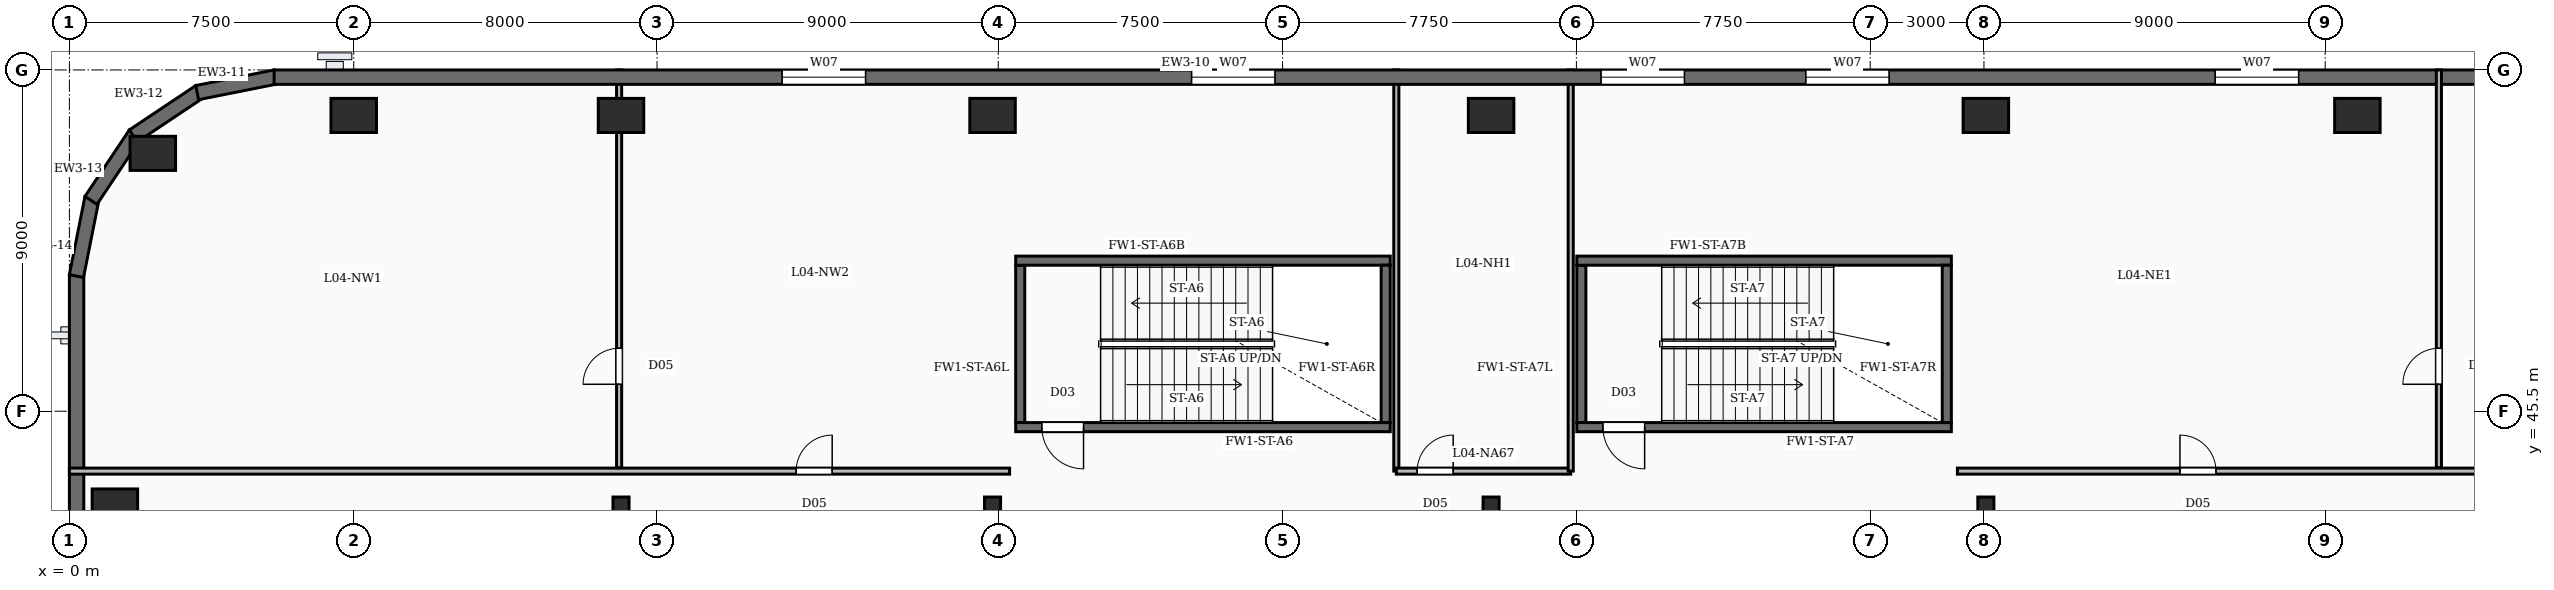
"""IFC4 building model, lengths in metres.
Left out: names, types, materials, properties, quantities, classifications, styles, units other than length and angle.
Written with IfcOpenShell. Run it as: python <this file> out.ifc"""

import sys

from ifc_helpers import new_model, si_unit, direction, frame, frame_2d, origin, origin_2d, place, context, subcontext, project, spatial, rectangle, i_section, extrude, element, fill, save


model = new_model("IFC4")
c1 = context("Model", 3, precision=1e-05, world=origin(), true_north=direction((0.0, 1.0)))
c2 = subcontext(c1, "Body", "Model", "MODEL_VIEW")
j1 = project(units=[si_unit("LENGTHUNIT", "METRE"), si_unit("PLANEANGLEUNIT", "RADIAN")], contexts=[c1])
p1 = place(None, origin())
s1 = spatial("IfcSite", under=j1, at=p1, CompositionType="ELEMENT")
p2 = place(p1, origin())
s2 = spatial("IfcBuilding", under=s1, at=p2, CompositionType="ELEMENT")
p3 = place(p2, frame((0.0, 0.0, 23.0)))
s3 = spatial("IfcBuildingStorey", under=s2, at=p3, CompositionType="ELEMENT", Elevation=23.0)
for number, where, z_axis, x_axis in (
    (1, (60.35, 53.3, -0.35), (0.0, 0.0, 1.0), (1.0, 0.0, 0.0)),
    (2, (50.55, 53.3, -0.35), (0.0, 0.0, 1.0), (1.0, 0.0, 0.0)),
    (3, (37.5, 53.3, -0.35), (0.0, 0.0, 1.0), (1.0, 0.0, 0.0)),
    (4, (24.35, 53.3, -0.35), (0.0, 0.0, 1.0), (1.0, 0.0, 0.0)),
    (5, (14.55, 53.3, -0.35), (0.0, 0.0, 1.0), (1.0, 0.0, 0.0)),
    (6, (7.5, 53.3, -0.35), (0.0, 0.0, 1.0), (1.0, 0.0, 0.0)),
    (7, (2.2, 52.3, -0.35), (0.0, 0.0, 1.0), (1.0, 0.0, 0.0)),
    (8, (1.2, 43.0, -0.35), (0.0, 0.0, 1.0), (1.0, 0.0, 0.0)),
):
    element("IfcColumn", number, at=place(p3, frame(where, z_axis=z_axis, x_axis=x_axis)), inside=s3, PredefinedType="COLUMN", context=c2, shape_type="SweptSolid", body=[
        extrude(rectangle(XDim=1.2, YDim=0.9, at=origin_2d()), origin(), (0.0, 0.0, 1.0), 5.0),
    ])
for number, where, z_axis, x_axis in (
    (9, (14.55, 43.0, -0.35), (0.0, 0.0, 1.0), (1.0, 0.0, 0.0)),
    (10, (24.35, 43.0, -0.35), (0.0, 0.0, 1.0), (1.0, 0.0, 0.0)),
    (11, (37.5, 43.0, -0.35), (0.0, 0.0, 1.0), (1.0, 0.0, 0.0)),
    (12, (50.55, 43.0, -0.35), (0.0, 0.0, 1.0), (1.0, 0.0, 0.0)),
):
    element("IfcColumn", number, at=place(p3, frame(where, z_axis=z_axis, x_axis=x_axis)), inside=s3, PredefinedType="COLUMN", context=c2, shape_type="SweptSolid", body=[
        extrude(i_section(OverallWidth=0.424, OverallDepth=0.474, WebThickness=0.048, FlangeThickness=0.077, FilletRadius=0.02, at=origin_2d()), origin(), (0.0, 0.0, 1.0), 5.0),
    ])
p4 = place(p3, frame((5.4, 54.31, 0.0), z_axis=(0.0, 0.0, 1.0), x_axis=(1.0, 0.0, 0.0)))
e13 = element("IfcWall", 13, at=p4, inside=s3, PredefinedType="SOLIDWALL", context=c2, shape_type="SweptSolid", body=[
    extrude(rectangle(XDim=68.7, YDim=0.38, at=frame_2d((34.35, 0.0))), origin(), (0.0, 0.0, 1.0), 4.65),
])
p5 = place(p4, frame((13.4, 0.0, 0.95)))
e14 = element("IfcOpeningElement", 14, at=p5, cuts=e13, PredefinedType="OPENING", context=c2, shape_type="SweptSolid", body=[
    extrude(rectangle(XDim=2.2, YDim=2.5, at=frame_2d((1.1, 1.25))), frame((0.0, 0.2, 0.0), z_axis=(0.0, -1.0, 0.0), x_axis=(1.0, 0.0, 0.0)), (0.0, 0.0, 1.0), 0.4),
])
p6 = place(p4, frame((24.2, 0.0, 0.95)))
e15 = element("IfcOpeningElement", 15, at=p6, cuts=e13, PredefinedType="OPENING", context=c2, shape_type="SweptSolid", body=[
    extrude(rectangle(XDim=2.2, YDim=2.5, at=frame_2d((1.1, 1.25))), frame((0.0, 0.2, 0.0), z_axis=(0.0, -1.0, 0.0), x_axis=(1.0, 0.0, 0.0)), (0.0, 0.0, 1.0), 0.4),
])
p7 = place(p4, frame((35.0, 0.0, 0.95)))
e16 = element("IfcOpeningElement", 16, at=p7, cuts=e13, PredefinedType="OPENING", context=c2, shape_type="SweptSolid", body=[
    extrude(rectangle(XDim=2.2, YDim=2.5, at=frame_2d((1.1, 1.25))), frame((0.0, 0.2, 0.0), z_axis=(0.0, -1.0, 0.0), x_axis=(1.0, 0.0, 0.0)), (0.0, 0.0, 1.0), 0.4),
])
p8 = place(p4, frame((40.4, 0.0, 0.95)))
e17 = element("IfcOpeningElement", 17, at=p8, cuts=e13, PredefinedType="OPENING", context=c2, shape_type="SweptSolid", body=[
    extrude(rectangle(XDim=2.2, YDim=2.5, at=frame_2d((1.1, 1.25))), frame((0.0, 0.2, 0.0), z_axis=(0.0, -1.0, 0.0), x_axis=(1.0, 0.0, 0.0)), (0.0, 0.0, 1.0), 0.4),
])
p9 = place(p4, frame((51.2, 0.0, 0.95)))
e18 = element("IfcOpeningElement", 18, at=p9, cuts=e13, PredefinedType="OPENING", context=c2, shape_type="SweptSolid", body=[
    extrude(rectangle(XDim=2.2, YDim=2.5, at=frame_2d((1.1, 1.25))), frame((0.0, 0.2, 0.0), z_axis=(0.0, -1.0, 0.0), x_axis=(1.0, 0.0, 0.0)), (0.0, 0.0, 1.0), 0.4),
])
p10 = place(p4, frame((62.0, 0.0, 0.95)))
e19 = element("IfcOpeningElement", 19, at=p10, cuts=e13, PredefinedType="OPENING", context=c2, shape_type="SweptSolid", body=[
    extrude(rectangle(XDim=2.2, YDim=2.5, at=frame_2d((1.1, 1.25))), frame((0.0, 0.2, 0.0), z_axis=(0.0, -1.0, 0.0), x_axis=(1.0, 0.0, 0.0)), (0.0, 0.0, 1.0), 0.4),
])
for number, where, z_axis, x_axis in (
    (20, (3.371, 53.903, 0.0), (0.0, 0.0, 1.0), (0.981, 0.195, 0.0)),
    (21, (1.687, 52.76, 0.0), (0.0, 0.0, 1.0), (0.832, 0.556, 0.0)),
    (22, (0.569, 51.061, 0.0), (0.0, 0.0, 1.0), (0.556, 0.832, 0.0)),
    (23, (0.186, 49.063, 0.0), (0.0, 0.0, 1.0), (0.195, 0.981, 0.0)),
):
    element("IfcWall", number, at=place(p3, frame(where, z_axis=z_axis, x_axis=x_axis)), inside=s3, PredefinedType="SOLIDWALL", context=c2, shape_type="SweptSolid", body=[
        extrude(rectangle(XDim=2.107, YDim=0.38, at=frame_2d((1.053, 0.0))), origin(), (0.0, 0.0, 1.0), 4.65),
    ])
p11 = place(p3, frame((0.19, 5.4, 0.0), z_axis=(0.0, 0.0, 1.0), x_axis=(0.0, 1.0, 0.0)))
e24 = element("IfcWall", 24, at=p11, inside=s3, PredefinedType="SOLIDWALL", context=c2, shape_type="SweptSolid", body=[
    extrude(rectangle(XDim=43.7, YDim=0.38, at=frame_2d((21.85, 0.0))), origin(), (0.0, 0.0, 1.0), 4.65),
])
p12 = place(p11, frame((2.6, 0.0, 0.95)))
e25 = element("IfcOpeningElement", 25, at=p12, cuts=e24, PredefinedType="OPENING", context=c2, shape_type="SweptSolid", body=[
    extrude(rectangle(XDim=2.2, YDim=2.5, at=frame_2d((1.1, 1.25))), frame((0.0, 0.2, 0.0), z_axis=(0.0, -1.0, 0.0), x_axis=(1.0, 0.0, 0.0)), (0.0, 0.0, 1.0), 0.4),
])
p13 = place(p11, frame((8.0, 0.0, 0.95)))
e26 = element("IfcOpeningElement", 26, at=p13, cuts=e24, PredefinedType="OPENING", context=c2, shape_type="SweptSolid", body=[
    extrude(rectangle(XDim=2.2, YDim=2.5, at=frame_2d((1.1, 1.25))), frame((0.0, 0.2, 0.0), z_axis=(0.0, -1.0, 0.0), x_axis=(1.0, 0.0, 0.0)), (0.0, 0.0, 1.0), 0.4),
])
p14 = place(p11, frame((18.8, 0.0, 0.95)))
e27 = element("IfcOpeningElement", 27, at=p14, cuts=e24, PredefinedType="OPENING", context=c2, shape_type="SweptSolid", body=[
    extrude(rectangle(XDim=2.2, YDim=2.5, at=frame_2d((1.1, 1.25))), frame((0.0, 0.2, 0.0), z_axis=(0.0, -1.0, 0.0), x_axis=(1.0, 0.0, 0.0)), (0.0, 0.0, 1.0), 0.4),
])
p15 = place(p11, frame((24.2, 0.0, 0.95)))
e28 = element("IfcOpeningElement", 28, at=p15, cuts=e24, PredefinedType="OPENING", context=c2, shape_type="SweptSolid", body=[
    extrude(rectangle(XDim=2.2, YDim=2.5, at=frame_2d((1.1, 1.25))), frame((0.0, 0.2, 0.0), z_axis=(0.0, -1.0, 0.0), x_axis=(1.0, 0.0, 0.0)), (0.0, 0.0, 1.0), 0.4),
])
p16 = place(p11, frame((29.6, 0.0, 0.95)))
e29 = element("IfcOpeningElement", 29, at=p16, cuts=e24, PredefinedType="OPENING", context=c2, shape_type="SweptSolid", body=[
    extrude(rectangle(XDim=2.2, YDim=2.5, at=frame_2d((1.1, 1.25))), frame((0.0, 0.2, 0.0), z_axis=(0.0, -1.0, 0.0), x_axis=(1.0, 0.0, 0.0)), (0.0, 0.0, 1.0), 0.4),
])
p17 = place(p3, frame((34.84, 45.08, 0.0), z_axis=(0.0, 0.0, 1.0), x_axis=(-1.0, 0.0, 0.0)))
e30 = element("IfcWall", 30, at=p17, inside=s3, PredefinedType="SOLIDWALL", context=c2, shape_type="SweptSolid", body=[
    extrude(rectangle(XDim=9.88, YDim=0.24, at=frame_2d((4.94, 0.0))), origin(), (0.0, 0.0, 1.0), 4.65),
])
p18 = place(p17, frame((8.09, 0.0, 0.0)))
e31 = element("IfcOpeningElement", 31, at=p18, cuts=e30, PredefinedType="OPENING", context=c2, shape_type="SweptSolid", body=[
    extrude(rectangle(XDim=1.1, YDim=2.15, at=frame_2d((0.55, 1.075))), frame((0.0, 0.13, 0.0), z_axis=(0.0, -1.0, 0.0), x_axis=(1.0, 0.0, 0.0)), (0.0, 0.0, 1.0), 0.26),
])
p19 = place(p3, frame((24.96, 49.47, 0.0), z_axis=(0.0, 0.0, 1.0), x_axis=(1.0, 0.0, 0.0)))
e32 = element("IfcWall", 32, at=p19, inside=s3, PredefinedType="SOLIDWALL", context=c2, shape_type="SweptSolid", body=[
    extrude(rectangle(XDim=9.88, YDim=0.24, at=frame_2d((4.94, 0.0))), origin(), (0.0, 0.0, 1.0), 4.65),
])
for number, where, z_axis, x_axis in (
    (33, (25.08, 45.2, 0.0), (0.0, 0.0, 1.0), (0.0, 1.0, 0.0)),
    (34, (34.72, 45.2, 0.0), (0.0, 0.0, 1.0), (0.0, 1.0, 0.0)),
):
    element("IfcWall", number, at=place(p3, frame(where, z_axis=z_axis, x_axis=x_axis)), inside=s3, PredefinedType="SOLIDWALL", context=c2, shape_type="SweptSolid", body=[
        extrude(rectangle(XDim=4.15, YDim=0.24, at=frame_2d((2.075, 0.0))), origin(), (0.0, 0.0, 1.0), 4.65),
    ])
p20 = place(p3, frame((49.64, 45.08, 0.0), z_axis=(0.0, 0.0, 1.0), x_axis=(-1.0, 0.0, 0.0)))
e35 = element("IfcWall", 35, at=p20, inside=s3, PredefinedType="SOLIDWALL", context=c2, shape_type="SweptSolid", body=[
    extrude(rectangle(XDim=9.88, YDim=0.24, at=frame_2d((4.94, 0.0))), origin(), (0.0, 0.0, 1.0), 4.65),
])
p21 = place(p20, frame((8.09, 0.0, 0.0)))
e36 = element("IfcOpeningElement", 36, at=p21, cuts=e35, PredefinedType="OPENING", context=c2, shape_type="SweptSolid", body=[
    extrude(rectangle(XDim=1.1, YDim=2.15, at=frame_2d((0.55, 1.075))), frame((0.0, 0.13, 0.0), z_axis=(0.0, -1.0, 0.0), x_axis=(1.0, 0.0, 0.0)), (0.0, 0.0, 1.0), 0.26),
])
p22 = place(p3, frame((39.76, 49.47, 0.0), z_axis=(0.0, 0.0, 1.0), x_axis=(1.0, 0.0, 0.0)))
e37 = element("IfcWall", 37, at=p22, inside=s3, PredefinedType="SOLIDWALL", context=c2, shape_type="SweptSolid", body=[
    extrude(rectangle(XDim=9.88, YDim=0.24, at=frame_2d((4.94, 0.0))), origin(), (0.0, 0.0, 1.0), 4.65),
])
for number, where, z_axis, x_axis in (
    (38, (39.88, 45.2, 0.0), (0.0, 0.0, 1.0), (0.0, 1.0, 0.0)),
    (39, (49.52, 45.2, 0.0), (0.0, 0.0, 1.0), (0.0, 1.0, 0.0)),
):
    element("IfcWall", number, at=place(p3, frame(where, z_axis=z_axis, x_axis=x_axis)), inside=s3, PredefinedType="SOLIDWALL", context=c2, shape_type="SweptSolid", body=[
        extrude(rectangle(XDim=4.15, YDim=0.24, at=frame_2d((2.075, 0.0))), origin(), (0.0, 0.0, 1.0), 4.65),
    ])
p23 = place(p3, frame((14.5, 44.01, 0.0), z_axis=(0.0, 0.0, 1.0), x_axis=(0.0, 1.0, 0.0)))
e40 = element("IfcWall", 40, at=p23, inside=s3, PredefinedType="PARTITIONING", context=c2, shape_type="SweptSolid", body=[
    extrude(rectangle(XDim=10.49, YDim=0.135, at=frame_2d((5.245, 0.0))), origin(), (0.0, 0.0, 1.0), 3.71),
])
p24 = place(p23, frame((2.2, 0.0, 0.0)))
e41 = element("IfcOpeningElement", 41, at=p24, cuts=e40, PredefinedType="OPENING", context=c2, shape_type="SweptSolid", body=[
    extrude(rectangle(XDim=0.95, YDim=2.15, at=frame_2d((0.475, 1.075))), frame((0.0, 0.077, 0.0), z_axis=(0.0, -1.0, 0.0), x_axis=(1.0, 0.0, 0.0)), (0.0, 0.0, 1.0), 0.155),
])
p25 = place(p3, frame((0.0, 43.92, 0.0), z_axis=(0.0, 0.0, 1.0), x_axis=(1.0, 0.0, 0.0)))
e42 = element("IfcWall", 42, at=p25, inside=s3, PredefinedType="PARTITIONING", context=c2, shape_type="SweptSolid", body=[
    extrude(rectangle(XDim=24.8, YDim=0.16, at=frame_2d((12.4, 0.0))), origin(), (0.0, 0.0, 1.0), 3.71),
])
p26 = place(p25, frame((19.17, 0.0, 0.0)))
e43 = element("IfcOpeningElement", 43, at=p26, cuts=e42, PredefinedType="OPENING", context=c2, shape_type="SweptSolid", body=[
    extrude(rectangle(XDim=0.95, YDim=2.15, at=frame_2d((0.475, 1.075))), frame((0.0, 0.09, 0.0), z_axis=(0.0, -1.0, 0.0), x_axis=(1.0, 0.0, 0.0)), (0.0, 0.0, 1.0), 0.18),
])
p27 = place(p3, frame((62.5, 44.01, 0.0), z_axis=(0.0, 0.0, 1.0), x_axis=(0.0, 1.0, 0.0)))
e44 = element("IfcWall", 44, at=p27, inside=s3, PredefinedType="PARTITIONING", context=c2, shape_type="SweptSolid", body=[
    extrude(rectangle(XDim=10.49, YDim=0.135, at=frame_2d((5.245, 0.0))), origin(), (0.0, 0.0, 1.0), 3.71),
])
p28 = place(p27, frame((2.2, 0.0, 0.0)))
e45 = element("IfcOpeningElement", 45, at=p28, cuts=e44, PredefinedType="OPENING", context=c2, shape_type="SweptSolid", body=[
    extrude(rectangle(XDim=0.95, YDim=2.15, at=frame_2d((0.475, 1.075))), frame((0.0, 0.077, 0.0), z_axis=(0.0, -1.0, 0.0), x_axis=(1.0, 0.0, 0.0)), (0.0, 0.0, 1.0), 0.155),
])
p29 = place(p3, frame((49.8, 43.92, 0.0), z_axis=(0.0, 0.0, 1.0), x_axis=(1.0, 0.0, 0.0)))
e46 = element("IfcWall", 46, at=p29, inside=s3, PredefinedType="PARTITIONING", context=c2, shape_type="SweptSolid", body=[
    extrude(rectangle(XDim=29.7, YDim=0.16, at=frame_2d((14.85, 0.0))), origin(), (0.0, 0.0, 1.0), 3.71),
])
p30 = place(p29, frame((5.87, 0.0, 0.0)))
e47 = element("IfcOpeningElement", 47, at=p30, cuts=e46, PredefinedType="OPENING", context=c2, shape_type="SweptSolid", body=[
    extrude(rectangle(XDim=0.95, YDim=2.15, at=frame_2d((0.475, 1.075))), frame((0.0, 0.09, 0.0), z_axis=(0.0, -1.0, 0.0), x_axis=(1.0, 0.0, 0.0)), (0.0, 0.0, 1.0), 0.18),
])
p31 = place(p29, frame((17.52, 0.0, 0.0)))
e48 = element("IfcOpeningElement", 48, at=p31, cuts=e46, PredefinedType="OPENING", context=c2, shape_type="SweptSolid", body=[
    extrude(rectangle(XDim=0.95, YDim=2.15, at=frame_2d((0.475, 1.075))), frame((0.0, 0.09, 0.0), z_axis=(0.0, -1.0, 0.0), x_axis=(1.0, 0.0, 0.0)), (0.0, 0.0, 1.0), 0.18),
])
p32 = place(p3, frame((35.0, 43.92, 0.0), z_axis=(0.0, 0.0, 1.0), x_axis=(1.0, 0.0, 0.0)))
e49 = element("IfcWall", 49, at=p32, inside=s3, PredefinedType="PARTITIONING", context=c2, shape_type="SweptSolid", body=[
    extrude(rectangle(XDim=4.6, YDim=0.16, at=frame_2d((2.3, 0.0))), origin(), (0.0, 0.0, 1.0), 3.71),
])
p33 = place(p32, frame((0.55, 0.0, 0.0)))
e50 = element("IfcOpeningElement", 50, at=p33, cuts=e49, PredefinedType="OPENING", context=c2, shape_type="SweptSolid", body=[
    extrude(rectangle(XDim=0.95, YDim=2.15, at=frame_2d((0.475, 1.075))), frame((0.0, 0.09, 0.0), z_axis=(0.0, -1.0, 0.0), x_axis=(1.0, 0.0, 0.0)), (0.0, 0.0, 1.0), 0.18),
])
for number, where, z_axis, x_axis in (
    (51, (35.0, 43.92, 0.0), (0.0, 0.0, 1.0), (0.0, 1.0, 0.0)),
    (52, (39.6, 43.92, 0.0), (0.0, 0.0, 1.0), (0.0, 1.0, 0.0)),
):
    element("IfcWall", number, at=place(p3, frame(where, z_axis=z_axis, x_axis=x_axis)), inside=s3, PredefinedType="PARTITIONING", context=c2, shape_type="SweptSolid", body=[
        extrude(rectangle(XDim=10.58, YDim=0.135, at=frame_2d((5.29, 0.0))), origin(), (0.0, 0.0, 1.0), 3.71),
    ])
p34 = place(p5, origin())
e53 = element("IfcWindow", 53, at=p34, inside=s3, PartitioningType="DOUBLE_PANEL_VERTICAL", PredefinedType="WINDOW", context=c2, shape_type="SweptSolid", body=[
    extrude(rectangle(XDim=2.2, YDim=2.5, at=frame_2d((1.1, 1.25))), frame((0.0, 0.03, 0.0), z_axis=(0.0, -1.0, 0.0), x_axis=(1.0, 0.0, 0.0)), (0.0, 0.0, 1.0), 0.06),
])
fill(e14, e53)
p35 = place(p6, origin())
e54 = element("IfcWindow", 54, at=p35, inside=s3, PartitioningType="DOUBLE_PANEL_VERTICAL", PredefinedType="WINDOW", context=c2, shape_type="SweptSolid", body=[
    extrude(rectangle(XDim=2.2, YDim=2.5, at=frame_2d((1.1, 1.25))), frame((0.0, 0.03, 0.0), z_axis=(0.0, -1.0, 0.0), x_axis=(1.0, 0.0, 0.0)), (0.0, 0.0, 1.0), 0.06),
])
fill(e15, e54)
p36 = place(p7, origin())
e55 = element("IfcWindow", 55, at=p36, inside=s3, PartitioningType="DOUBLE_PANEL_VERTICAL", PredefinedType="WINDOW", context=c2, shape_type="SweptSolid", body=[
    extrude(rectangle(XDim=2.2, YDim=2.5, at=frame_2d((1.1, 1.25))), frame((0.0, 0.03, 0.0), z_axis=(0.0, -1.0, 0.0), x_axis=(1.0, 0.0, 0.0)), (0.0, 0.0, 1.0), 0.06),
])
fill(e16, e55)
p37 = place(p8, origin())
e56 = element("IfcWindow", 56, at=p37, inside=s3, PartitioningType="DOUBLE_PANEL_VERTICAL", PredefinedType="WINDOW", context=c2, shape_type="SweptSolid", body=[
    extrude(rectangle(XDim=2.2, YDim=2.5, at=frame_2d((1.1, 1.25))), frame((0.0, 0.03, 0.0), z_axis=(0.0, -1.0, 0.0), x_axis=(1.0, 0.0, 0.0)), (0.0, 0.0, 1.0), 0.06),
])
fill(e17, e56)
p38 = place(p9, origin())
e57 = element("IfcWindow", 57, at=p38, inside=s3, PartitioningType="DOUBLE_PANEL_VERTICAL", PredefinedType="WINDOW", context=c2, shape_type="SweptSolid", body=[
    extrude(rectangle(XDim=2.2, YDim=2.5, at=frame_2d((1.1, 1.25))), frame((0.0, 0.03, 0.0), z_axis=(0.0, -1.0, 0.0), x_axis=(1.0, 0.0, 0.0)), (0.0, 0.0, 1.0), 0.06),
])
fill(e18, e57)
p39 = place(p18, origin())
e58 = element("IfcDoor", 58, at=p39, inside=s3, OperationType="SINGLE_SWING_LEFT", PredefinedType="DOOR", context=c2, shape_type="SweptSolid", body=[
    extrude(rectangle(XDim=1.1, YDim=2.15, at=frame_2d((0.55, 1.075))), frame((0.0, 0.025, 0.0), z_axis=(0.0, -1.0, 0.0), x_axis=(1.0, 0.0, 0.0)), (0.0, 0.0, 1.0), 0.05),
])
fill(e31, e58)
p40 = place(p21, origin())
e59 = element("IfcDoor", 59, at=p40, inside=s3, OperationType="SINGLE_SWING_LEFT", PredefinedType="DOOR", context=c2, shape_type="SweptSolid", body=[
    extrude(rectangle(XDim=1.1, YDim=2.15, at=frame_2d((0.55, 1.075))), frame((0.0, 0.025, 0.0), z_axis=(0.0, -1.0, 0.0), x_axis=(1.0, 0.0, 0.0)), (0.0, 0.0, 1.0), 0.05),
])
fill(e36, e59)
p41 = place(p24, origin())
e60 = element("IfcDoor", 60, at=p41, inside=s3, OperationType="SINGLE_SWING_LEFT", PredefinedType="DOOR", context=c2, shape_type="SweptSolid", body=[
    extrude(rectangle(XDim=0.95, YDim=2.15, at=frame_2d((0.475, 1.075))), frame((0.0, 0.025, 0.0), z_axis=(0.0, -1.0, 0.0), x_axis=(1.0, 0.0, 0.0)), (0.0, 0.0, 1.0), 0.05),
])
fill(e41, e60)
p42 = place(p26, origin())
e61 = element("IfcDoor", 61, at=p42, inside=s3, OperationType="SINGLE_SWING_RIGHT", PredefinedType="DOOR", context=c2, shape_type="SweptSolid", body=[
    extrude(rectangle(XDim=0.95, YDim=2.15, at=frame_2d((0.475, 1.075))), frame((0.0, 0.025, 0.0), z_axis=(0.0, -1.0, 0.0), x_axis=(1.0, 0.0, 0.0)), (0.0, 0.0, 1.0), 0.05),
])
fill(e43, e61)
p43 = place(p28, origin())
e62 = element("IfcDoor", 62, at=p43, inside=s3, OperationType="SINGLE_SWING_LEFT", PredefinedType="DOOR", context=c2, shape_type="SweptSolid", body=[
    extrude(rectangle(XDim=0.95, YDim=2.15, at=frame_2d((0.475, 1.075))), frame((0.0, 0.025, 0.0), z_axis=(0.0, -1.0, 0.0), x_axis=(1.0, 0.0, 0.0)), (0.0, 0.0, 1.0), 0.05),
])
fill(e45, e62)
p44 = place(p30, origin())
e63 = element("IfcDoor", 63, at=p44, inside=s3, OperationType="SINGLE_SWING_LEFT", PredefinedType="DOOR", context=c2, shape_type="SweptSolid", body=[
    extrude(rectangle(XDim=0.95, YDim=2.15, at=frame_2d((0.475, 1.075))), frame((0.0, 0.025, 0.0), z_axis=(0.0, -1.0, 0.0), x_axis=(1.0, 0.0, 0.0)), (0.0, 0.0, 1.0), 0.05),
])
fill(e47, e63)
p45 = place(p33, origin())
e64 = element("IfcDoor", 64, at=p45, inside=s3, OperationType="SINGLE_SWING_RIGHT", PredefinedType="DOOR", context=c2, shape_type="SweptSolid", body=[
    extrude(rectangle(XDim=0.95, YDim=2.15, at=frame_2d((0.475, 1.075))), frame((0.0, 0.025, 0.0), z_axis=(0.0, -1.0, 0.0), x_axis=(1.0, 0.0, 0.0)), (0.0, 0.0, 1.0), 0.05),
])
fill(e50, e64)
save(model, sys.argv[1])
